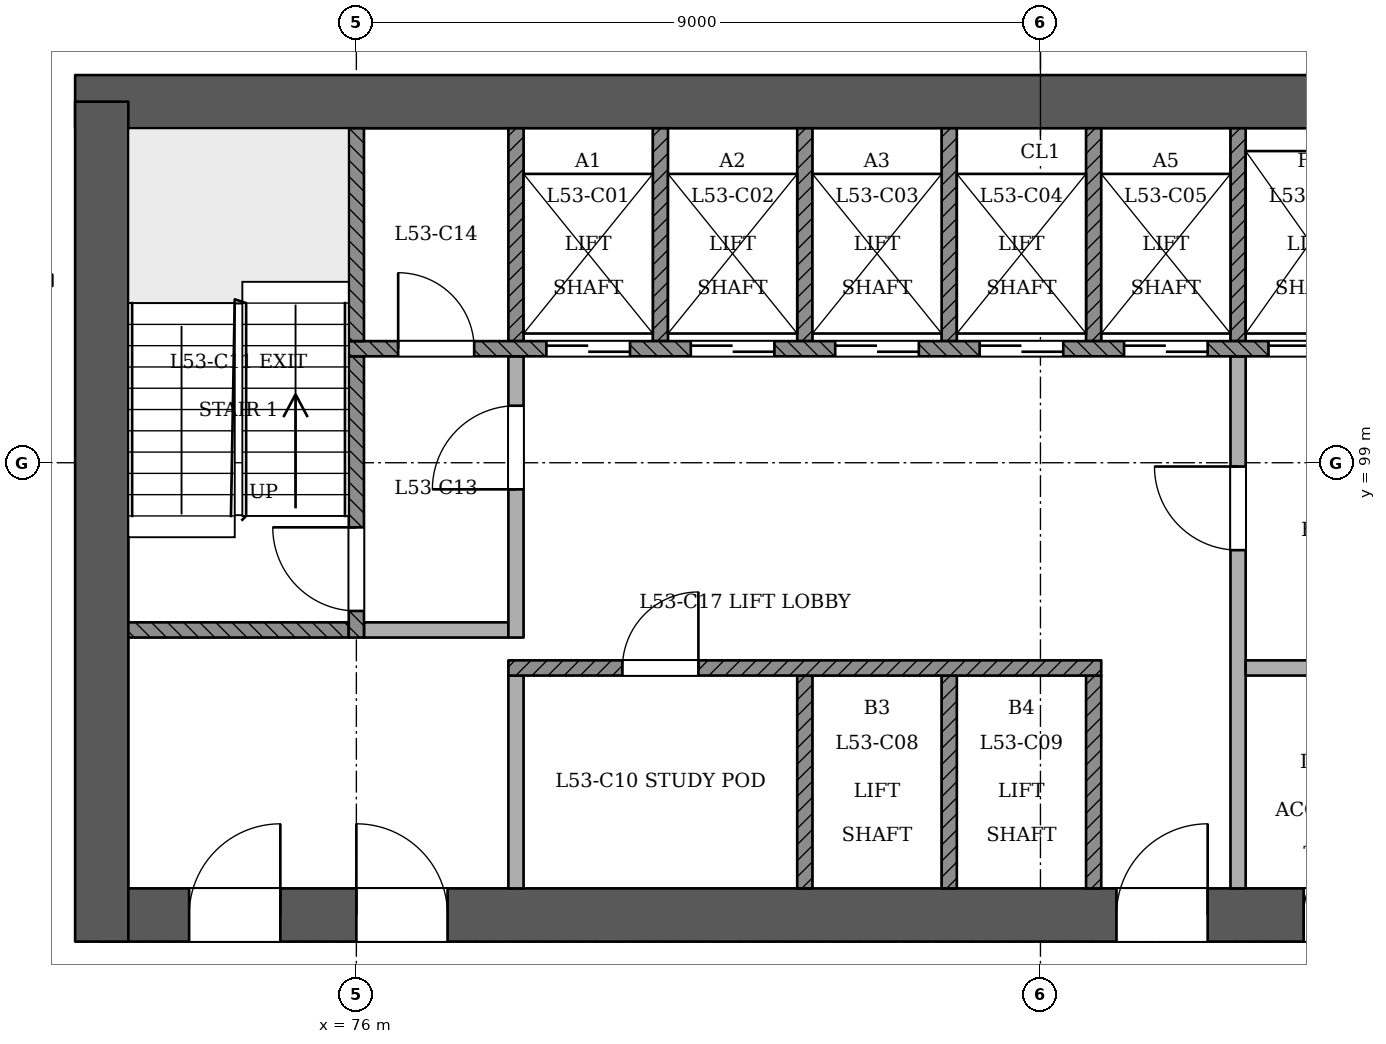
"""IFC4 building model, lengths in metres.
Left out: names, types, materials, properties, quantities, classifications, styles, units other than length and angle.
Written with IfcOpenShell. Run it as: python <this file> out.ifc"""

import sys

from ifc_helpers import new_model, si_unit, direction, frame, frame_2d, origin, place, context, subcontext, project, spatial, rectangle, extrude, element, fill, save


model = new_model("IFC4")
c1 = context("Model", 3, precision=1e-05, world=origin(), true_north=direction((0.0, 1.0)))
c2 = subcontext(c1, "Body", "Model", "MODEL_VIEW")
j1 = project(units=[si_unit("LENGTHUNIT", "METRE"), si_unit("PLANEANGLEUNIT", "RADIAN")], contexts=[c1])
p1 = place(None, origin())
s1 = spatial("IfcSite", under=j1, at=p1, CompositionType="ELEMENT")
p2 = place(p1, origin())
s2 = spatial("IfcBuilding", under=s1, at=p2, CompositionType="ELEMENT")
p3 = place(p2, frame((0.0, 0.0, 205.2)))
s3 = spatial("IfcBuildingStorey", under=s2, at=p3, CompositionType="ELEMENT", Elevation=205.2)
p4 = place(p3, frame((72.65, 93.05, 0.0), z_axis=(0.0, 0.0, 1.0), x_axis=(1.0, 0.0, 0.0)))
e1 = element("IfcWall", 1, at=p4, inside=s3, PredefinedType="SHEAR", context=c2, shape_type="SweptSolid", body=[
    extrude(rectangle(XDim=25.05, YDim=0.7, at=frame_2d((12.525, 0.0))), origin(), (0.0, 0.0, 1.0), 3.6),
])
p5 = place(p4, frame((1.15, 0.0, 0.0)))
e2 = element("IfcOpeningElement", 2, at=p5, cuts=e1, PredefinedType="OPENING", context=c2, shape_type="SweptSolid", body=[
    extrude(rectangle(XDim=1.2, YDim=2.1, at=frame_2d((0.6, 1.05))), frame((0.0, 0.36, 0.0), z_axis=(0.0, -1.0, 0.0), x_axis=(1.0, 0.0, 0.0)), (0.0, 0.0, 1.0), 0.721),
])
p6 = place(p4, frame((3.35, 0.0, 0.0)))
e3 = element("IfcOpeningElement", 3, at=p6, cuts=e1, PredefinedType="OPENING", context=c2, shape_type="SweptSolid", body=[
    extrude(rectangle(XDim=1.2, YDim=2.1, at=frame_2d((0.6, 1.05))), frame((0.0, 0.36, 0.0), z_axis=(0.0, -1.0, 0.0), x_axis=(1.0, 0.0, 0.0)), (0.0, 0.0, 1.0), 0.721),
])
p7 = place(p4, frame((13.35, 0.0, 0.0)))
e4 = element("IfcOpeningElement", 4, at=p7, cuts=e1, PredefinedType="OPENING", context=c2, shape_type="SweptSolid", body=[
    extrude(rectangle(XDim=1.2, YDim=2.1, at=frame_2d((0.6, 1.05))), frame((0.0, 0.36, 0.0), z_axis=(0.0, -1.0, 0.0), x_axis=(1.0, 0.0, 0.0)), (0.0, 0.0, 1.0), 0.721),
])
p8 = place(p4, frame((15.812, 0.0, 0.0)))
e5 = element("IfcOpeningElement", 5, at=p8, cuts=e1, PredefinedType="OPENING", context=c2, shape_type="SweptSolid", body=[
    extrude(rectangle(XDim=1.0, YDim=2.1, at=frame_2d((0.5, 1.05))), frame((0.0, 0.36, 0.0), z_axis=(0.0, -1.0, 0.0), x_axis=(1.0, 0.0, 0.0)), (0.0, 0.0, 1.0), 0.721),
])
p9 = place(p4, frame((18.25, 0.0, 0.0)))
e6 = element("IfcOpeningElement", 6, at=p9, cuts=e1, PredefinedType="OPENING", context=c2, shape_type="SweptSolid", body=[
    extrude(rectangle(XDim=1.0, YDim=2.1, at=frame_2d((0.5, 1.05))), frame((0.0, 0.36, 0.0), z_axis=(0.0, -1.0, 0.0), x_axis=(1.0, 0.0, 0.0)), (0.0, 0.0, 1.0), 0.721),
])
p10 = place(p4, frame((20.6, 0.0, 0.0)))
e7 = element("IfcOpeningElement", 7, at=p10, cuts=e1, PredefinedType="OPENING", context=c2, shape_type="SweptSolid", body=[
    extrude(rectangle(XDim=1.0, YDim=2.1, at=frame_2d((0.5, 1.05))), frame((0.0, 0.36, 0.0), z_axis=(0.0, -1.0, 0.0), x_axis=(1.0, 0.0, 0.0)), (0.0, 0.0, 1.0), 0.721),
])
p11 = place(p4, frame((22.887, 0.0, 0.0)))
e8 = element("IfcOpeningElement", 8, at=p11, cuts=e1, PredefinedType="OPENING", context=c2, shape_type="SweptSolid", body=[
    extrude(rectangle(XDim=1.0, YDim=2.1, at=frame_2d((0.5, 1.05))), frame((0.0, 0.36, 0.0), z_axis=(0.0, -1.0, 0.0), x_axis=(1.0, 0.0, 0.0)), (0.0, 0.0, 1.0), 0.721),
])
p12 = place(p3, frame((97.35, 103.75, 0.0), z_axis=(0.0, 0.0, 1.0), x_axis=(-1.0, 0.0, 0.0)))
e9 = element("IfcWall", 9, at=p12, inside=s3, PredefinedType="SHEAR", context=c2, shape_type="SweptSolid", body=[
    extrude(rectangle(XDim=25.05, YDim=0.7, at=frame_2d((12.525, 0.0))), origin(), (0.0, 0.0, 1.0), 3.6),
])
p13 = place(p3, frame((72.65, 103.75, 0.0), z_axis=(0.0, 0.0, 1.0), x_axis=(0.0, -1.0, 0.0)))
e10 = element("IfcWall", 10, at=p13, inside=s3, PredefinedType="SHEAR", context=c2, shape_type="SweptSolid", body=[
    extrude(rectangle(XDim=11.05, YDim=0.7, at=frame_2d((5.525, 0.0))), origin(), (0.0, 0.0, 1.0), 3.6),
])
p14 = place(p3, frame((72.0, 101.4, 0.0), z_axis=(0.0, 0.0, 1.0), x_axis=(-1.0, 0.0, 0.0)))
e11 = element("IfcWall", 11, at=p14, inside=s3, PredefinedType="PARTITIONING", context=c2, shape_type="SweptSolid", body=[
    extrude(rectangle(XDim=1.8, YDim=0.15, at=frame_2d((0.9, 0.0))), origin(), (0.0, 0.0, 1.0), 3.15),
])
p15 = place(p3, frame((78.1, 93.4, 0.0), z_axis=(0.0, 0.0, 1.0), x_axis=(0.0, 1.0, 0.0)))
e12 = element("IfcWall", 12, at=p15, inside=s3, PredefinedType="PARTITIONING", context=c2, shape_type="SweptSolid", body=[
    extrude(rectangle(XDim=2.8, YDim=0.2, at=frame_2d((1.4, 0.0))), origin(), (0.0, 0.0, 1.0), 3.15),
])
for number, where, z_axis, x_axis in (
    (13, (81.9, 93.4, 0.0), (0.0, 0.0, 1.0), (0.0, 1.0, 0.0)),
    (14, (83.8, 93.4, 0.0), (0.0, 0.0, 1.0), (0.0, 1.0, 0.0)),
    (15, (85.7, 93.4, 0.0), (0.0, 0.0, 1.0), (0.0, 1.0, 0.0)),
):
    element("IfcWall", number, at=place(p3, frame(where, z_axis=z_axis, x_axis=x_axis)), inside=s3, PredefinedType="SOLIDWALL", context=c2, shape_type="SweptSolid", body=[
        extrude(rectangle(XDim=2.8, YDim=0.2, at=frame_2d((1.4, 0.0))), origin(), (0.0, 0.0, 1.0), 3.15),
    ])
p16 = place(p3, frame((87.6, 93.4, 0.0), z_axis=(0.0, 0.0, 1.0), x_axis=(0.0, 1.0, 0.0)))
e16 = element("IfcWall", 16, at=p16, inside=s3, PredefinedType="PARTITIONING", context=c2, shape_type="SweptSolid", body=[
    extrude(rectangle(XDim=7.0, YDim=0.2, at=frame_2d((3.5, 0.0))), origin(), (0.0, 0.0, 1.0), 3.15),
])
p17 = place(p16, frame((4.45, 0.0, 0.0)))
e17 = element("IfcOpeningElement", 17, at=p17, cuts=e16, PredefinedType="OPENING", context=c2, shape_type="SweptSolid", body=[
    extrude(rectangle(XDim=1.1, YDim=2.1, at=frame_2d((0.55, 1.05))), frame((0.0, 0.11, 0.0), z_axis=(0.0, -1.0, 0.0), x_axis=(1.0, 0.0, 0.0)), (0.0, 0.0, 1.0), 0.221),
])
p18 = place(p3, frame((78.0, 96.3, 0.0), z_axis=(0.0, 0.0, 1.0), x_axis=(1.0, 0.0, 0.0)))
e18 = element("IfcWall", 18, at=p18, inside=s3, PredefinedType="SOLIDWALL", context=c2, shape_type="SweptSolid", body=[
    extrude(rectangle(XDim=7.8, YDim=0.2, at=frame_2d((3.9, 0.0))), origin(), (0.0, 0.0, 1.0), 3.15),
])
p19 = place(p18, frame((1.5, 0.0, 0.0)))
e19 = element("IfcOpeningElement", 19, at=p19, cuts=e18, PredefinedType="OPENING", context=c2, shape_type="SweptSolid", body=[
    extrude(rectangle(XDim=1.0, YDim=2.1, at=frame_2d((0.5, 1.05))), frame((0.0, 0.11, 0.0), z_axis=(0.0, -1.0, 0.0), x_axis=(1.0, 0.0, 0.0)), (0.0, 0.0, 1.0), 0.221),
])
p20 = place(p3, frame((87.7, 96.3, 0.0), z_axis=(0.0, 0.0, 1.0), x_axis=(1.0, 0.0, 0.0)))
e20 = element("IfcWall", 20, at=p20, inside=s3, PredefinedType="PARTITIONING", context=c2, shape_type="SweptSolid", body=[
    extrude(rectangle(XDim=3.6, YDim=0.2, at=frame_2d((1.8, 0.0))), origin(), (0.0, 0.0, 1.0), 3.15),
])
p21 = place(p3, frame((73.0, 96.8, 0.0), z_axis=(0.0, 0.0, 1.0), x_axis=(1.0, 0.0, 0.0)))
e21 = element("IfcWall", 21, at=p21, inside=s3, PredefinedType="SOLIDWALL", context=c2, shape_type="SweptSolid", body=[
    extrude(rectangle(XDim=2.9, YDim=0.2, at=frame_2d((1.45, 0.0))), origin(), (0.0, 0.0, 1.0), 3.15),
])
p22 = place(p3, frame((76.0, 96.7, 0.0), z_axis=(0.0, 0.0, 1.0), x_axis=(0.0, 1.0, 0.0)))
e22 = element("IfcWall", 22, at=p22, inside=s3, PredefinedType="SOLIDWALL", context=c2, shape_type="SweptSolid", body=[
    extrude(rectangle(XDim=3.7, YDim=0.2, at=frame_2d((1.85, 0.0))), origin(), (0.0, 0.0, 1.0), 3.15),
])
p23 = place(p22, frame((0.35, 0.0, 0.0)))
e23 = element("IfcOpeningElement", 23, at=p23, cuts=e22, PredefinedType="OPENING", context=c2, shape_type="SweptSolid", body=[
    extrude(rectangle(XDim=1.1, YDim=2.1, at=frame_2d((0.55, 1.05))), frame((0.0, 0.11, 0.0), z_axis=(0.0, -1.0, 0.0), x_axis=(1.0, 0.0, 0.0)), (0.0, 0.0, 1.0), 0.221),
])
p24 = place(p3, frame((76.1, 96.8, 0.0), z_axis=(0.0, 0.0, 1.0), x_axis=(1.0, 0.0, 0.0)))
e24 = element("IfcWall", 24, at=p24, inside=s3, PredefinedType="PARTITIONING", context=c2, shape_type="SweptSolid", body=[
    extrude(rectangle(XDim=1.9, YDim=0.2, at=frame_2d((0.95, 0.0))), origin(), (0.0, 0.0, 1.0), 3.15),
])
p25 = place(p3, frame((78.1, 96.7, 0.0), z_axis=(0.0, 0.0, 1.0), x_axis=(0.0, 1.0, 0.0)))
e25 = element("IfcWall", 25, at=p25, inside=s3, PredefinedType="PARTITIONING", context=c2, shape_type="SweptSolid", body=[
    extrude(rectangle(XDim=3.7, YDim=0.2, at=frame_2d((1.85, 0.0))), origin(), (0.0, 0.0, 1.0), 3.15),
])
p26 = place(p25, frame((1.95, 0.0, 0.0)))
e26 = element("IfcOpeningElement", 26, at=p26, cuts=e25, PredefinedType="OPENING", context=c2, shape_type="SweptSolid", body=[
    extrude(rectangle(XDim=1.1, YDim=2.1, at=frame_2d((0.55, 1.05))), frame((0.0, 0.11, 0.0), z_axis=(0.0, -1.0, 0.0), x_axis=(1.0, 0.0, 0.0)), (0.0, 0.0, 1.0), 0.221),
])
p27 = place(p3, frame((75.9, 100.5, 0.0), z_axis=(0.0, 0.0, 1.0), x_axis=(1.0, 0.0, 0.0)))
e27 = element("IfcWall", 27, at=p27, inside=s3, PredefinedType="SOLIDWALL", context=c2, shape_type="SweptSolid", body=[
    extrude(rectangle(XDim=18.2, YDim=0.2, at=frame_2d((9.1, 0.0))), origin(), (0.0, 0.0, 1.0), 3.15),
])
p28 = place(p27, frame((2.6, 0.0, 0.0)))
e28 = element("IfcOpeningElement", 28, at=p28, cuts=e27, PredefinedType="OPENING", context=c2, shape_type="SweptSolid", body=[
    extrude(rectangle(XDim=1.1, YDim=2.1, at=frame_2d((0.55, 1.05))), frame((0.0, 0.11, 0.0), z_axis=(0.0, -1.0, 0.0), x_axis=(1.0, 0.0, 0.0)), (0.0, 0.0, 1.0), 0.221),
])
p29 = place(p27, frame((4.5, 0.0, 0.0)))
e29 = element("IfcOpeningElement", 29, at=p29, cuts=e27, PredefinedType="OPENING", context=c2, shape_type="SweptSolid", body=[
    extrude(rectangle(XDim=1.1, YDim=2.1, at=frame_2d((0.55, 1.05))), frame((0.0, 0.11, 0.0), z_axis=(0.0, -1.0, 0.0), x_axis=(1.0, 0.0, 0.0)), (0.0, 0.0, 1.0), 0.221),
])
p30 = place(p27, frame((6.4, 0.0, 0.0)))
e30 = element("IfcOpeningElement", 30, at=p30, cuts=e27, PredefinedType="OPENING", context=c2, shape_type="SweptSolid", body=[
    extrude(rectangle(XDim=1.1, YDim=2.1, at=frame_2d((0.55, 1.05))), frame((0.0, 0.11, 0.0), z_axis=(0.0, -1.0, 0.0), x_axis=(1.0, 0.0, 0.0)), (0.0, 0.0, 1.0), 0.221),
])
p31 = place(p27, frame((8.3, 0.0, 0.0)))
e31 = element("IfcOpeningElement", 31, at=p31, cuts=e27, PredefinedType="OPENING", context=c2, shape_type="SweptSolid", body=[
    extrude(rectangle(XDim=1.1, YDim=2.1, at=frame_2d((0.55, 1.05))), frame((0.0, 0.11, 0.0), z_axis=(0.0, -1.0, 0.0), x_axis=(1.0, 0.0, 0.0)), (0.0, 0.0, 1.0), 0.221),
])
p32 = place(p27, frame((10.2, 0.0, 0.0)))
e32 = element("IfcOpeningElement", 32, at=p32, cuts=e27, PredefinedType="OPENING", context=c2, shape_type="SweptSolid", body=[
    extrude(rectangle(XDim=1.1, YDim=2.1, at=frame_2d((0.55, 1.05))), frame((0.0, 0.11, 0.0), z_axis=(0.0, -1.0, 0.0), x_axis=(1.0, 0.0, 0.0)), (0.0, 0.0, 1.0), 0.221),
])
p33 = place(p27, frame((12.1, 0.0, 0.0)))
e33 = element("IfcOpeningElement", 33, at=p33, cuts=e27, PredefinedType="OPENING", context=c2, shape_type="SweptSolid", body=[
    extrude(rectangle(XDim=1.1, YDim=2.1, at=frame_2d((0.55, 1.05))), frame((0.0, 0.11, 0.0), z_axis=(0.0, -1.0, 0.0), x_axis=(1.0, 0.0, 0.0)), (0.0, 0.0, 1.0), 0.221),
])
p34 = place(p27, frame((14.0, 0.0, 0.0)))
e34 = element("IfcOpeningElement", 34, at=p34, cuts=e27, PredefinedType="OPENING", context=c2, shape_type="SweptSolid", body=[
    extrude(rectangle(XDim=1.1, YDim=2.1, at=frame_2d((0.55, 1.05))), frame((0.0, 0.11, 0.0), z_axis=(0.0, -1.0, 0.0), x_axis=(1.0, 0.0, 0.0)), (0.0, 0.0, 1.0), 0.221),
])
p35 = place(p27, frame((0.65, 0.0, 0.0)))
e35 = element("IfcOpeningElement", 35, at=p35, cuts=e27, PredefinedType="OPENING", context=c2, shape_type="SweptSolid", body=[
    extrude(rectangle(XDim=1.0, YDim=2.1, at=frame_2d((0.5, 1.05))), frame((0.0, 0.11, 0.0), z_axis=(0.0, -1.0, 0.0), x_axis=(1.0, 0.0, 0.0)), (0.0, 0.0, 1.0), 0.221),
])
p36 = place(p27, frame((16.3, 0.0, 0.0)))
e36 = element("IfcOpeningElement", 36, at=p36, cuts=e27, PredefinedType="OPENING", context=c2, shape_type="SweptSolid", body=[
    extrude(rectangle(XDim=1.0, YDim=2.1, at=frame_2d((0.5, 1.05))), frame((0.0, 0.11, 0.0), z_axis=(0.0, -1.0, 0.0), x_axis=(1.0, 0.0, 0.0)), (0.0, 0.0, 1.0), 0.221),
])
for number, where, z_axis, x_axis in (
    (37, (76.0, 100.6, 0.0), (0.0, 0.0, 1.0), (0.0, 1.0, 0.0)),
    (38, (78.1, 100.6, 0.0), (0.0, 0.0, 1.0), (0.0, 1.0, 0.0)),
    (39, (80.0, 100.6, 0.0), (0.0, 0.0, 1.0), (0.0, 1.0, 0.0)),
    (40, (81.9, 100.6, 0.0), (0.0, 0.0, 1.0), (0.0, 1.0, 0.0)),
    (41, (83.8, 100.6, 0.0), (0.0, 0.0, 1.0), (0.0, 1.0, 0.0)),
    (42, (85.7, 100.6, 0.0), (0.0, 0.0, 1.0), (0.0, 1.0, 0.0)),
    (43, (87.6, 100.6, 0.0), (0.0, 0.0, 1.0), (0.0, 1.0, 0.0)),
):
    element("IfcWall", number, at=place(p3, frame(where, z_axis=z_axis, x_axis=x_axis)), inside=s3, PredefinedType="SOLIDWALL", context=c2, shape_type="SweptSolid", body=[
        extrude(rectangle(XDim=2.8, YDim=0.2, at=frame_2d((1.4, 0.0))), origin(), (0.0, 0.0, 1.0), 3.15),
    ])
p37 = place(p28, origin())
e44 = element("IfcDoor", 44, at=p37, inside=s3, OperationType="SLIDING_TO_RIGHT", PredefinedType="NOTDEFINED", context=c2, shape_type="SweptSolid", body=[
    extrude(rectangle(XDim=1.1, YDim=2.1, at=frame_2d((0.55, 1.05))), frame((0.0, 0.025, 0.0), z_axis=(0.0, -1.0, 0.0), x_axis=(1.0, 0.0, 0.0)), (0.0, 0.0, 1.0), 0.05),
])
fill(e28, e44)
p38 = place(p29, origin())
e45 = element("IfcDoor", 45, at=p38, inside=s3, OperationType="SLIDING_TO_LEFT", PredefinedType="NOTDEFINED", context=c2, shape_type="SweptSolid", body=[
    extrude(rectangle(XDim=1.1, YDim=2.1, at=frame_2d((0.55, 1.05))), frame((0.0, 0.025, 0.0), z_axis=(0.0, -1.0, 0.0), x_axis=(1.0, 0.0, 0.0)), (0.0, 0.0, 1.0), 0.05),
])
fill(e29, e45)
p39 = place(p30, origin())
e46 = element("IfcDoor", 46, at=p39, inside=s3, OperationType="SLIDING_TO_RIGHT", PredefinedType="NOTDEFINED", context=c2, shape_type="SweptSolid", body=[
    extrude(rectangle(XDim=1.1, YDim=2.1, at=frame_2d((0.55, 1.05))), frame((0.0, 0.025, 0.0), z_axis=(0.0, -1.0, 0.0), x_axis=(1.0, 0.0, 0.0)), (0.0, 0.0, 1.0), 0.05),
])
fill(e30, e46)
p40 = place(p31, origin())
e47 = element("IfcDoor", 47, at=p40, inside=s3, OperationType="SLIDING_TO_LEFT", PredefinedType="NOTDEFINED", context=c2, shape_type="SweptSolid", body=[
    extrude(rectangle(XDim=1.1, YDim=2.1, at=frame_2d((0.55, 1.05))), frame((0.0, 0.025, 0.0), z_axis=(0.0, -1.0, 0.0), x_axis=(1.0, 0.0, 0.0)), (0.0, 0.0, 1.0), 0.05),
])
fill(e31, e47)
p41 = place(p32, origin())
e48 = element("IfcDoor", 48, at=p41, inside=s3, OperationType="SLIDING_TO_RIGHT", PredefinedType="NOTDEFINED", context=c2, shape_type="SweptSolid", body=[
    extrude(rectangle(XDim=1.1, YDim=2.1, at=frame_2d((0.55, 1.05))), frame((0.0, 0.025, 0.0), z_axis=(0.0, -1.0, 0.0), x_axis=(1.0, 0.0, 0.0)), (0.0, 0.0, 1.0), 0.05),
])
fill(e32, e48)
p42 = place(p33, origin())
e49 = element("IfcDoor", 49, at=p42, inside=s3, OperationType="SLIDING_TO_RIGHT", PredefinedType="NOTDEFINED", context=c2, shape_type="SweptSolid", body=[
    extrude(rectangle(XDim=1.1, YDim=2.1, at=frame_2d((0.55, 1.05))), frame((0.0, 0.025, 0.0), z_axis=(0.0, -1.0, 0.0), x_axis=(1.0, 0.0, 0.0)), (0.0, 0.0, 1.0), 0.05),
])
fill(e33, e49)
p43 = place(p23, origin())
e50 = element("IfcDoor", 50, at=p43, inside=s3, OperationType="SINGLE_SWING_RIGHT", PredefinedType="NOTDEFINED", context=c2, shape_type="SweptSolid", body=[
    extrude(rectangle(XDim=1.1, YDim=2.1, at=frame_2d((0.55, 1.05))), frame((0.0, 0.025, 0.0), z_axis=(0.0, -1.0, 0.0), x_axis=(1.0, 0.0, 0.0)), (0.0, 0.0, 1.0), 0.05),
])
fill(e23, e50)
p44 = place(p26, origin())
e51 = element("IfcDoor", 51, at=p44, inside=s3, OperationType="SINGLE_SWING_LEFT", PredefinedType="NOTDEFINED", context=c2, shape_type="SweptSolid", body=[
    extrude(rectangle(XDim=1.1, YDim=2.1, at=frame_2d((0.55, 1.05))), frame((0.0, 0.025, 0.0), z_axis=(0.0, -1.0, 0.0), x_axis=(1.0, 0.0, 0.0)), (0.0, 0.0, 1.0), 0.05),
])
fill(e26, e51)
p45 = place(p17, origin())
e52 = element("IfcDoor", 52, at=p45, inside=s3, OperationType="SINGLE_SWING_RIGHT", PredefinedType="NOTDEFINED", context=c2, shape_type="SweptSolid", body=[
    extrude(rectangle(XDim=1.1, YDim=2.1, at=frame_2d((0.55, 1.05))), frame((0.0, 0.025, 0.0), z_axis=(0.0, -1.0, 0.0), x_axis=(1.0, 0.0, 0.0)), (0.0, 0.0, 1.0), 0.05),
])
fill(e17, e52)
p46 = place(p5, origin())
e53 = element("IfcDoor", 53, at=p46, inside=s3, OperationType="SINGLE_SWING_RIGHT", PredefinedType="NOTDEFINED", context=c2, shape_type="SweptSolid", body=[
    extrude(rectangle(XDim=1.2, YDim=2.1, at=frame_2d((0.6, 1.05))), frame((0.0, 0.025, 0.0), z_axis=(0.0, -1.0, 0.0), x_axis=(1.0, 0.0, 0.0)), (0.0, 0.0, 1.0), 0.05),
])
fill(e2, e53)
p47 = place(p6, origin())
e54 = element("IfcDoor", 54, at=p47, inside=s3, OperationType="SINGLE_SWING_LEFT", PredefinedType="NOTDEFINED", context=c2, shape_type="SweptSolid", body=[
    extrude(rectangle(XDim=1.2, YDim=2.1, at=frame_2d((0.6, 1.05))), frame((0.0, 0.025, 0.0), z_axis=(0.0, -1.0, 0.0), x_axis=(1.0, 0.0, 0.0)), (0.0, 0.0, 1.0), 0.05),
])
fill(e3, e54)
p48 = place(p7, origin())
e55 = element("IfcDoor", 55, at=p48, inside=s3, OperationType="SINGLE_SWING_RIGHT", PredefinedType="NOTDEFINED", context=c2, shape_type="SweptSolid", body=[
    extrude(rectangle(XDim=1.2, YDim=2.1, at=frame_2d((0.6, 1.05))), frame((0.0, 0.025, 0.0), z_axis=(0.0, -1.0, 0.0), x_axis=(1.0, 0.0, 0.0)), (0.0, 0.0, 1.0), 0.05),
])
fill(e4, e55)
p49 = place(p35, origin())
e56 = element("IfcDoor", 56, at=p49, inside=s3, OperationType="SINGLE_SWING_LEFT", PredefinedType="NOTDEFINED", context=c2, shape_type="SweptSolid", body=[
    extrude(rectangle(XDim=1.0, YDim=2.1, at=frame_2d((0.5, 1.05))), frame((0.0, 0.025, 0.0), z_axis=(0.0, -1.0, 0.0), x_axis=(1.0, 0.0, 0.0)), (0.0, 0.0, 1.0), 0.05),
])
fill(e35, e56)
p50 = place(p8, origin())
e57 = element("IfcDoor", 57, at=p50, inside=s3, OperationType="SINGLE_SWING_RIGHT", PredefinedType="NOTDEFINED", context=c2, shape_type="SweptSolid", body=[
    extrude(rectangle(XDim=1.0, YDim=2.1, at=frame_2d((0.5, 1.05))), frame((0.0, 0.025, 0.0), z_axis=(0.0, -1.0, 0.0), x_axis=(1.0, 0.0, 0.0)), (0.0, 0.0, 1.0), 0.05),
])
fill(e5, e57)
p51 = place(p19, origin())
e58 = element("IfcDoor", 58, at=p51, inside=s3, OperationType="SINGLE_SWING_RIGHT", PredefinedType="NOTDEFINED", context=c2, shape_type="SweptSolid", body=[
    extrude(rectangle(XDim=1.0, YDim=2.1, at=frame_2d((0.5, 1.05))), frame((0.0, 0.025, 0.0), z_axis=(0.0, -1.0, 0.0), x_axis=(1.0, 0.0, 0.0)), (0.0, 0.0, 1.0), 0.05),
])
fill(e19, e58)
save(model, sys.argv[1])
